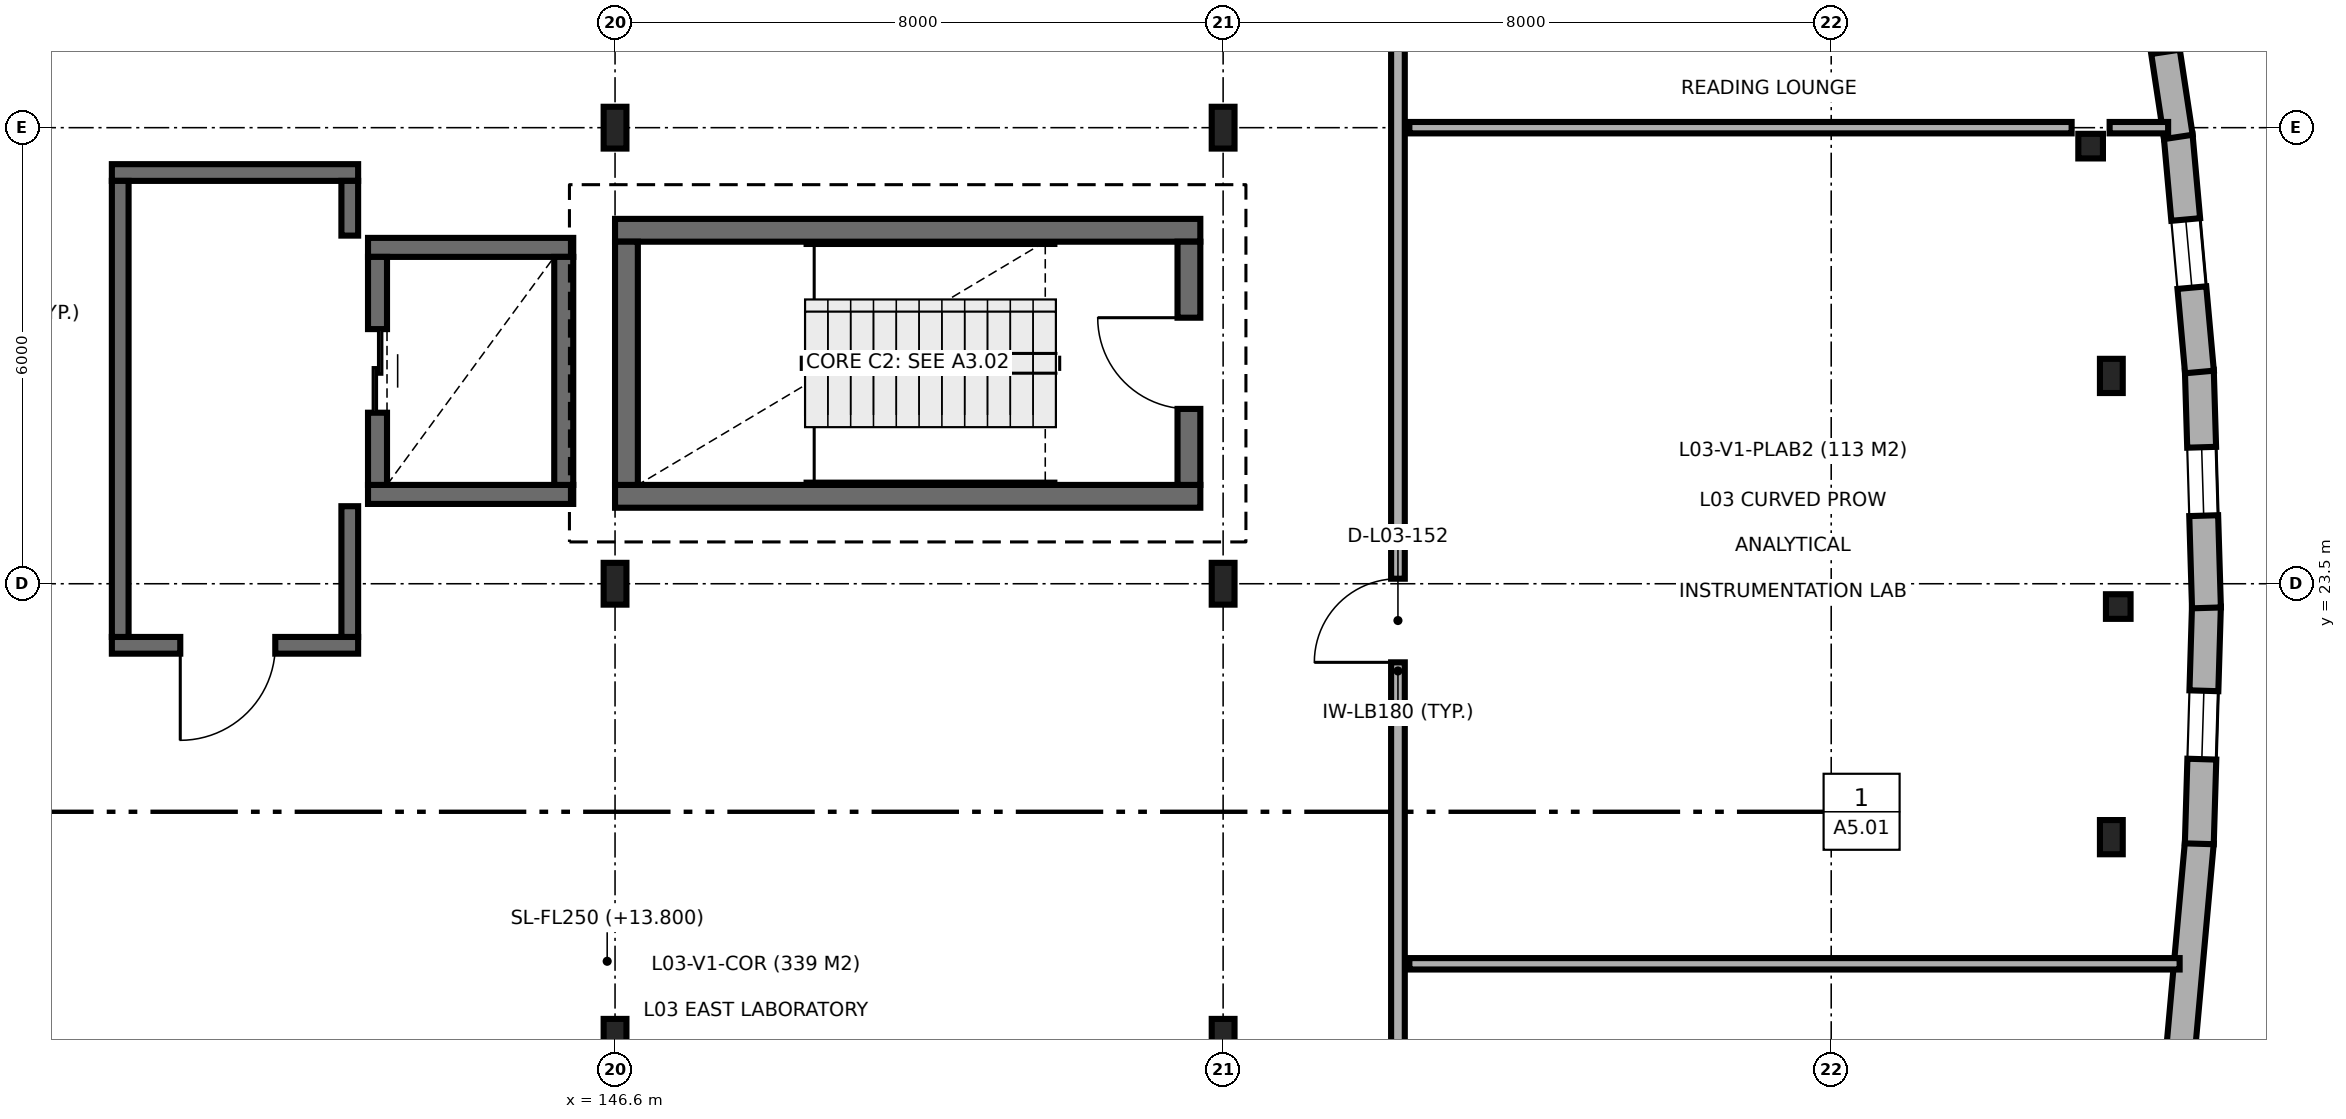
"""IFC4 building model, lengths in metres.
Left out: names, types, materials, properties, quantities, classifications, styles, units other than length and angle.
Written with IfcOpenShell. Run it as: python <this file> out.ifc"""

import sys

from ifc_helpers import new_model, si_unit, direction, frame, frame_2d, origin, origin_2d, place, context, subcontext, project, spatial, rectangle, hollow_circle, i_section, extrude, element, fill, save


model = new_model("IFC4")
c1 = context("Model", 3, precision=1e-05, world=origin(), true_north=direction((0.0, 1.0)))
c2 = subcontext(c1, "Body", "Model", "MODEL_VIEW")
j1 = project(units=[si_unit("LENGTHUNIT", "METRE"), si_unit("PLANEANGLEUNIT", "RADIAN")], contexts=[c1])
p1 = place(None, origin())
s1 = spatial("IfcSite", under=j1, at=p1, CompositionType="ELEMENT")
p2 = place(p1, origin())
s2 = spatial("IfcBuilding", under=s1, at=p2, CompositionType="ELEMENT")
p3 = place(p2, frame((0.0, 0.0, 13.8)))
s3 = spatial("IfcBuildingStorey", under=s2, at=p3, CompositionType="ELEMENT", Elevation=13.8)
for number, where, z_axis, x_axis in (
    (1, (146.6, 17.5, 0.0), (0.0, 0.0, 1.0), (1.0, 0.0, 0.0)),
    (2, (146.6, 23.5, 0.0), (0.0, 0.0, 1.0), (1.0, 0.0, 0.0)),
    (3, (146.6, 29.5, 0.0), (0.0, 0.0, 1.0), (1.0, 0.0, 0.0)),
    (4, (154.6, 17.5, 0.0), (0.0, 0.0, 1.0), (1.0, 0.0, 0.0)),
    (5, (154.6, 23.5, 0.0), (0.0, 0.0, 1.0), (1.0, 0.0, 0.0)),
    (6, (154.6, 29.5, 0.0), (0.0, 0.0, 1.0), (1.0, 0.0, 0.0)),
):
    element("IfcColumn", number, at=place(p3, frame(where, z_axis=z_axis, x_axis=x_axis)), inside=s3, PredefinedType="COLUMN", context=c2, shape_type="SweptSolid", body=[
        extrude(i_section(OverallWidth=0.3, OverallDepth=0.55, WebThickness=0.015, FlangeThickness=0.029, FilletRadius=0.027, at=origin_2d()), origin(), (0.0, 0.0, 1.0), 4.5),
    ])
p4 = place(p3, frame((166.013, 29.257, 0.0), z_axis=(0.0, 0.0, 1.0), x_axis=(1.0, 0.0, 0.0)))
e7 = element("IfcColumn", 7, at=p4, inside=s3, PredefinedType="COLUMN", context=c2, shape_type="SweptSolid", body=[
    extrude(hollow_circle(Radius=0.162, WallThickness=0.016, at=origin_2d()), origin(), (0.0, 0.0, 1.0), 4.5),
])
for number, where, z_axis, x_axis in (
    (8, (166.285, 20.166, 0.0), (0.0, 0.0, 1.0), (1.0, 0.0, 0.0)),
    (9, (166.285, 26.234, 0.0), (0.0, 0.0, 1.0), (1.0, 0.0, 0.0)),
):
    element("IfcColumn", number, at=place(p3, frame(where, z_axis=z_axis, x_axis=x_axis)), inside=s3, PredefinedType="COLUMN", context=c2, shape_type="SweptSolid", body=[
        extrude(i_section(OverallWidth=0.3, OverallDepth=0.45, WebThickness=0.014, FlangeThickness=0.026, FilletRadius=0.027, at=origin_2d()), origin(), (0.0, 0.0, 1.0), 4.5),
    ])
p5 = place(p3, frame((166.376, 23.2, 0.0), z_axis=(0.0, 0.0, 1.0), x_axis=(1.0, 0.0, 0.0)))
e10 = element("IfcColumn", 10, at=p5, inside=s3, PredefinedType="COLUMN", context=c2, shape_type="SweptSolid", body=[
    extrude(hollow_circle(Radius=0.162, WallThickness=0.016, at=origin_2d()), origin(), (0.0, 0.0, 1.0), 4.5),
])
for number, where, z_axis, x_axis in (
    (11, (146.6, 24.65, 0.0), (0.0, 0.0, 1.0), (1.0, 0.0, 0.0)),
    (12, (154.3, 28.15, 0.0), (0.0, 0.0, 1.0), (-1.0, 0.0, 0.0)),
):
    element("IfcWall", number, at=place(p3, frame(where, z_axis=z_axis, x_axis=x_axis)), inside=s3, PredefinedType="SHEAR", context=c2, shape_type="SweptSolid", body=[
        extrude(rectangle(XDim=7.7, YDim=0.3, at=frame_2d((3.85, 0.0))), origin(), (0.0, 0.0, 1.0), 4.5),
    ])
p6 = place(p3, frame((146.75, 28.0, 0.0), z_axis=(0.0, 0.0, 1.0), x_axis=(0.0, -1.0, 0.0)))
e13 = element("IfcWall", 13, at=p6, inside=s3, PredefinedType="SHEAR", context=c2, shape_type="SweptSolid", body=[
    extrude(rectangle(XDim=3.2, YDim=0.3, at=frame_2d((1.6, 0.0))), origin(), (0.0, 0.0, 1.0), 4.5),
])
p7 = place(p3, frame((154.15, 24.8, 0.0), z_axis=(0.0, 0.0, 1.0), x_axis=(0.0, 1.0, 0.0)))
e14 = element("IfcWall", 14, at=p7, inside=s3, PredefinedType="SHEAR", context=c2, shape_type="SweptSolid", body=[
    extrude(rectangle(XDim=3.2, YDim=0.3, at=frame_2d((1.6, 0.0))), origin(), (0.0, 0.0, 1.0), 4.5),
])
p8 = place(p7, frame((1.0, 0.0, 0.0)))
e15 = element("IfcOpeningElement", 15, at=p8, cuts=e14, PredefinedType="OPENING", context=c2, shape_type="SweptSolid", body=[
    extrude(rectangle(XDim=1.2, YDim=2.15, at=frame_2d((0.6, 1.075))), frame((0.0, 0.16, 0.0), z_axis=(0.0, -1.0, 0.0), x_axis=(1.0, 0.0, 0.0)), (0.0, 0.0, 1.0), 0.32),
])
for number, where, z_axis, x_axis in (
    (16, (143.35, 24.675, 0.0), (0.0, 0.0, 1.0), (1.0, 0.0, 0.0)),
    (17, (146.05, 27.925, 0.0), (0.0, 0.0, 1.0), (-1.0, 0.0, 0.0)),
):
    element("IfcWall", number, at=place(p3, frame(where, z_axis=z_axis, x_axis=x_axis)), inside=s3, PredefinedType="SHEAR", context=c2, shape_type="SweptSolid", body=[
        extrude(rectangle(XDim=2.7, YDim=0.25, at=frame_2d((1.35, 0.0))), origin(), (0.0, 0.0, 1.0), 4.5),
    ])
p9 = place(p3, frame((143.475, 27.8, 0.0), z_axis=(0.0, 0.0, 1.0), x_axis=(0.0, -1.0, 0.0)))
e18 = element("IfcWall", 18, at=p9, inside=s3, PredefinedType="SHEAR", context=c2, shape_type="SweptSolid", body=[
    extrude(rectangle(XDim=3.0, YDim=0.25, at=frame_2d((1.5, 0.0))), origin(), (0.0, 0.0, 1.0), 4.5),
])
p10 = place(p9, frame((0.95, 0.0, 0.0)))
e19 = element("IfcOpeningElement", 19, at=p10, cuts=e18, PredefinedType="OPENING", context=c2, shape_type="SweptSolid", body=[
    extrude(rectangle(XDim=1.1, YDim=2.15, at=frame_2d((0.55, 1.075))), frame((0.0, 0.135, 0.0), z_axis=(0.0, -1.0, 0.0), x_axis=(1.0, 0.0, 0.0)), (0.0, 0.0, 1.0), 0.27),
])
p11 = place(p3, frame((145.925, 24.8, 0.0), z_axis=(0.0, 0.0, 1.0), x_axis=(0.0, 1.0, 0.0)))
e20 = element("IfcWall", 20, at=p11, inside=s3, PredefinedType="SHEAR", context=c2, shape_type="SweptSolid", body=[
    extrude(rectangle(XDim=3.0, YDim=0.25, at=frame_2d((1.5, 0.0))), origin(), (0.0, 0.0, 1.0), 4.5),
])
p12 = place(p3, frame((139.98, 22.69, 0.0), z_axis=(0.0, 0.0, 1.0), x_axis=(1.0, 0.0, 0.0)))
e21 = element("IfcWall", 21, at=p12, inside=s3, PredefinedType="SOLIDWALL", context=c2, shape_type="SweptSolid", body=[
    extrude(rectangle(XDim=3.24, YDim=0.22, at=frame_2d((1.62, 0.0))), origin(), (0.0, 0.0, 1.0), 4.25),
])
p13 = place(p12, frame((0.9, 0.0, 0.0)))
e22 = element("IfcOpeningElement", 22, at=p13, cuts=e21, PredefinedType="OPENING", context=c2, shape_type="SweptSolid", body=[
    extrude(rectangle(XDim=1.25, YDim=2.15, at=frame_2d((0.625, 1.075))), frame((0.0, 0.12, 0.0), z_axis=(0.0, -1.0, 0.0), x_axis=(1.0, 0.0, 0.0)), (0.0, 0.0, 1.0), 0.24),
])
p14 = place(p3, frame((143.22, 28.91, 0.0), z_axis=(0.0, 0.0, 1.0), x_axis=(-1.0, 0.0, 0.0)))
e23 = element("IfcWall", 23, at=p14, inside=s3, PredefinedType="SOLIDWALL", context=c2, shape_type="SweptSolid", body=[
    extrude(rectangle(XDim=3.24, YDim=0.22, at=frame_2d((1.62, 0.0))), origin(), (0.0, 0.0, 1.0), 4.25),
])
p15 = place(p3, frame((140.09, 28.8, 0.0), z_axis=(0.0, 0.0, 1.0), x_axis=(0.0, -1.0, 0.0)))
e24 = element("IfcWall", 24, at=p15, inside=s3, PredefinedType="SOLIDWALL", context=c2, shape_type="SweptSolid", body=[
    extrude(rectangle(XDim=6.0, YDim=0.22, at=frame_2d((3.0, 0.0))), origin(), (0.0, 0.0, 1.0), 4.25),
])
p16 = place(p3, frame((143.11, 22.8, 0.0), z_axis=(0.0, 0.0, 1.0), x_axis=(0.0, 1.0, 0.0)))
e25 = element("IfcWall", 25, at=p16, inside=s3, PredefinedType="SOLIDWALL", context=c2, shape_type="SweptSolid", body=[
    extrude(rectangle(XDim=1.72, YDim=0.22, at=frame_2d((0.86, 0.0))), origin(), (0.0, 0.0, 1.0), 4.25),
])
p17 = place(p3, frame((143.11, 28.08, 0.0), z_axis=(0.0, 0.0, 1.0), x_axis=(0.0, 1.0, 0.0)))
e26 = element("IfcWall", 26, at=p17, inside=s3, PredefinedType="SOLIDWALL", context=c2, shape_type="SweptSolid", body=[
    extrude(rectangle(XDim=0.72, YDim=0.22, at=frame_2d((0.36, 0.0))), origin(), (0.0, 0.0, 1.0), 4.25),
])
p18 = place(p3, frame((167.163, 16.987, 0.0), z_axis=(0.0, 0.0, 1.0), x_axis=(0.089747627339, 0.995964539222, 0.0)))
e27 = element("IfcWall", 27, at=p18, inside=s3, PredefinedType="SOLIDWALL", context=c2, shape_type="SweptSolid", body=[
    extrude(rectangle(XDim=3.128, YDim=0.38, at=frame_2d((1.564, 0.0))), origin(), (0.0, 0.0, 1.0), 4.25),
])
p19 = place(p3, frame((167.443, 20.079, 0.0), z_axis=(0.0, 0.0, 1.0), x_axis=(0.02996779607, 0.999550864738, 0.0)))
e28 = element("IfcWall", 28, at=p19, inside=s3, PredefinedType="SOLIDWALL", context=c2, shape_type="SweptSolid", body=[
    extrude(rectangle(XDim=3.128, YDim=0.38, at=frame_2d((1.564, 0.0))), origin(), (0.0, 0.0, 1.0), 4.25),
])
p20 = place(p19, frame((1.114, 0.0, 0.9)))
e29 = element("IfcOpeningElement", 29, at=p20, cuts=e28, PredefinedType="OPENING", context=c2, shape_type="SweptSolid", body=[
    extrude(rectangle(XDim=0.9, YDim=1.8, at=frame_2d((0.45, 0.9))), frame((0.0, 0.2, 0.0), z_axis=(0.0, -1.0, 0.0), x_axis=(1.0, 0.0, 0.0)), (0.0, 0.0, 1.0), 0.4),
])
p21 = place(p3, frame((167.537, 23.182, 0.0), z_axis=(0.0, 0.0, 1.0), x_axis=(-0.029970133922, 0.999550794644, 0.0)))
e30 = element("IfcWall", 30, at=p21, inside=s3, PredefinedType="SOLIDWALL", context=c2, shape_type="SweptSolid", body=[
    extrude(rectangle(XDim=3.128, YDim=0.38, at=frame_2d((1.564, 0.0))), origin(), (0.0, 0.0, 1.0), 4.25),
])
p22 = place(p21, frame((1.214, 0.0, 0.9)))
e31 = element("IfcOpeningElement", 31, at=p22, cuts=e30, PredefinedType="OPENING", context=c2, shape_type="SweptSolid", body=[
    extrude(rectangle(XDim=0.9, YDim=1.8, at=frame_2d((0.45, 0.9))), frame((0.0, 0.2, 0.0), z_axis=(0.0, -1.0, 0.0), x_axis=(1.0, 0.0, 0.0)), (0.0, 0.0, 1.0), 0.4),
])
p23 = place(p3, frame((167.445, 26.286, 0.0), z_axis=(0.0, 0.0, 1.0), x_axis=(-0.089747627339, 0.995964539222, 0.0)))
e32 = element("IfcWall", 32, at=p23, inside=s3, PredefinedType="SOLIDWALL", context=c2, shape_type="SweptSolid", body=[
    extrude(rectangle(XDim=3.128, YDim=0.38, at=frame_2d((1.564, 0.0))), origin(), (0.0, 0.0, 1.0), 4.25),
])
p24 = place(p23, frame((1.114, 0.0, 0.9)))
e33 = element("IfcOpeningElement", 33, at=p24, cuts=e32, PredefinedType="OPENING", context=c2, shape_type="SweptSolid", body=[
    extrude(rectangle(XDim=0.9, YDim=1.8, at=frame_2d((0.45, 0.9))), frame((0.0, 0.2, 0.0), z_axis=(0.0, -1.0, 0.0), x_axis=(1.0, 0.0, 0.0)), (0.0, 0.0, 1.0), 0.4),
])
p25 = place(p3, frame((167.167, 29.378, 0.0), z_axis=(0.0, 0.0, 1.0), x_axis=(-0.149305964746, 0.988791044099, 0.0)))
e34 = element("IfcWall", 34, at=p25, inside=s3, PredefinedType="SOLIDWALL", context=c2, shape_type="SweptSolid", body=[
    extrude(rectangle(XDim=3.128, YDim=0.38, at=frame_2d((1.564, 0.0))), origin(), (0.0, 0.0, 1.0), 4.25),
])
p26 = place(p25, frame((1.132, 0.0, 0.9)))
e35 = element("IfcOpeningElement", 35, at=p26, cuts=e34, PredefinedType="OPENING", context=c2, shape_type="SweptSolid", body=[
    extrude(rectangle(XDim=0.9, YDim=1.8, at=frame_2d((0.45, 0.9))), frame((0.0, 0.2, 0.0), z_axis=(0.0, -1.0, 0.0), x_axis=(1.0, 0.0, 0.0)), (0.0, 0.0, 1.0), 0.4),
])
p27 = place(p3, frame((156.9, 5.205, 0.0), z_axis=(0.0, 0.0, 1.0), x_axis=(0.0, 1.0, 0.0)))
e36 = element("IfcWall", 36, at=p27, inside=s3, PredefinedType="PARTITIONING", context=c2, shape_type="SweptSolid", body=[
    extrude(rectangle(XDim=34.295, YDim=0.18, at=frame_2d((17.147, 0.0))), origin(), (0.0, 0.0, 1.0), 4.25),
])
p28 = place(p27, frame((6.559, 0.0, 0.0)))
e37 = element("IfcOpeningElement", 37, at=p28, cuts=e36, PredefinedType="OPENING", context=c2, shape_type="SweptSolid", body=[
    extrude(rectangle(XDim=1.5, YDim=2.2, at=frame_2d((0.75, 1.1))), frame((0.0, 0.1, 0.0), z_axis=(0.0, -1.0, 0.0), x_axis=(1.0, 0.0, 0.0)), (0.0, 0.0, 1.0), 0.2),
])
p29 = place(p27, frame((17.261, 0.0, 0.0)))
e38 = element("IfcOpeningElement", 38, at=p29, cuts=e36, PredefinedType="OPENING", context=c2, shape_type="SweptSolid", body=[
    extrude(rectangle(XDim=1.1, YDim=2.15, at=frame_2d((0.55, 1.075))), frame((0.0, 0.1, 0.0), z_axis=(0.0, -1.0, 0.0), x_axis=(1.0, 0.0, 0.0)), (0.0, 0.0, 1.0), 0.2),
])
p30 = place(p27, frame((27.343, 0.0, 0.0)))
e39 = element("IfcOpeningElement", 39, at=p30, cuts=e36, PredefinedType="OPENING", context=c2, shape_type="SweptSolid", body=[
    extrude(rectangle(XDim=0.95, YDim=2.1, at=frame_2d((0.475, 1.05))), frame((0.0, 0.1, 0.0), z_axis=(0.0, -1.0, 0.0), x_axis=(1.0, 0.0, 0.0)), (0.0, 0.0, 1.0), 0.2),
])
p31 = place(p3, frame((157.05, 18.5, 0.0), z_axis=(0.0, 0.0, 1.0), x_axis=(1.0, 0.0, 0.0)))
e40 = element("IfcWall", 40, at=p31, inside=s3, PredefinedType="PARTITIONING", context=c2, shape_type="SweptSolid", body=[
    extrude(rectangle(XDim=10.134, YDim=0.15, at=frame_2d((5.067, 0.0))), origin(), (0.0, 0.0, 1.0), 3.75),
])
p32 = place(p3, frame((157.05, 29.5, 0.0), z_axis=(0.0, 0.0, 1.0), x_axis=(1.0, 0.0, 0.0)))
e41 = element("IfcWall", 41, at=p32, inside=s3, PredefinedType="PARTITIONING", context=c2, shape_type="SweptSolid", body=[
    extrude(rectangle(XDim=8.713, YDim=0.15, at=frame_2d((4.356, 0.0))), origin(), (0.0, 0.0, 1.0), 3.75),
])
p33 = place(p3, frame((166.263, 29.5, 0.0), z_axis=(0.0, 0.0, 1.0), x_axis=(1.0, 0.0, 0.0)))
e42 = element("IfcWall", 42, at=p33, inside=s3, PredefinedType="PARTITIONING", context=c2, shape_type="SweptSolid", body=[
    extrude(rectangle(XDim=0.77, YDim=0.15, at=frame_2d((0.385, 0.0))), origin(), (0.0, 0.0, 1.0), 4.25),
])
p34 = place(p8, origin())
e43 = element("IfcDoor", 43, at=p34, inside=s3, OperationType="SINGLE_SWING_RIGHT", PredefinedType="DOOR", context=c2, shape_type="SweptSolid", body=[
    extrude(rectangle(XDim=1.2, YDim=2.15, at=frame_2d((0.6, 1.075))), frame((0.0, 0.025, 0.0), z_axis=(0.0, -1.0, 0.0), x_axis=(1.0, 0.0, 0.0)), (0.0, 0.0, 1.0), 0.05),
])
fill(e15, e43)
p35 = place(p10, origin())
e44 = element("IfcDoor", 44, at=p35, inside=s3, OperationType="DOUBLE_DOOR_SLIDING", PredefinedType="DOOR", context=c2, shape_type="SweptSolid", body=[
    extrude(rectangle(XDim=1.1, YDim=2.15, at=frame_2d((0.55, 1.075))), frame((0.0, 0.025, 0.0), z_axis=(0.0, -1.0, 0.0), x_axis=(1.0, 0.0, 0.0)), (0.0, 0.0, 1.0), 0.05),
])
fill(e19, e44)
p36 = place(p13, frame((1.25, 0.0, 0.0), z_axis=(0.0, 0.0, 1.0), x_axis=(-1.0, 0.0, 0.0)))
e45 = element("IfcDoor", 45, at=p36, inside=s3, OperationType="SINGLE_SWING_LEFT", PredefinedType="DOOR", context=c2, shape_type="SweptSolid", body=[
    extrude(rectangle(XDim=1.25, YDim=2.15, at=frame_2d((0.625, 1.075))), frame((0.0, 0.025, 0.0), z_axis=(0.0, -1.0, 0.0), x_axis=(1.0, 0.0, 0.0)), (0.0, 0.0, 1.0), 0.05),
])
fill(e22, e45)
p37 = place(p20, origin())
e46 = element("IfcWindow", 46, at=p37, inside=s3, PartitioningType="SINGLE_PANEL", PredefinedType="WINDOW", context=c2, shape_type="SweptSolid", body=[
    extrude(rectangle(XDim=0.9, YDim=1.8, at=frame_2d((0.45, 0.9))), frame((0.0, 0.03, 0.0), z_axis=(0.0, -1.0, 0.0), x_axis=(1.0, 0.0, 0.0)), (0.0, 0.0, 1.0), 0.06),
])
fill(e29, e46)
p38 = place(p22, origin())
e47 = element("IfcWindow", 47, at=p38, inside=s3, PartitioningType="SINGLE_PANEL", PredefinedType="WINDOW", context=c2, shape_type="SweptSolid", body=[
    extrude(rectangle(XDim=0.9, YDim=1.8, at=frame_2d((0.45, 0.9))), frame((0.0, 0.03, 0.0), z_axis=(0.0, -1.0, 0.0), x_axis=(1.0, 0.0, 0.0)), (0.0, 0.0, 1.0), 0.06),
])
fill(e31, e47)
p39 = place(p24, origin())
e48 = element("IfcWindow", 48, at=p39, inside=s3, PartitioningType="SINGLE_PANEL", PredefinedType="WINDOW", context=c2, shape_type="SweptSolid", body=[
    extrude(rectangle(XDim=0.9, YDim=1.8, at=frame_2d((0.45, 0.9))), frame((0.0, 0.03, 0.0), z_axis=(0.0, -1.0, 0.0), x_axis=(1.0, 0.0, 0.0)), (0.0, 0.0, 1.0), 0.06),
])
fill(e33, e48)
p40 = place(p26, origin())
e49 = element("IfcWindow", 49, at=p40, inside=s3, PartitioningType="SINGLE_PANEL", PredefinedType="WINDOW", context=c2, shape_type="SweptSolid", body=[
    extrude(rectangle(XDim=0.9, YDim=1.8, at=frame_2d((0.45, 0.9))), frame((0.0, 0.03, 0.0), z_axis=(0.0, -1.0, 0.0), x_axis=(1.0, 0.0, 0.0)), (0.0, 0.0, 1.0), 0.06),
])
fill(e35, e49)
p41 = place(p29, origin())
e50 = element("IfcDoor", 50, at=p41, inside=s3, OperationType="SINGLE_SWING_LEFT", PredefinedType="DOOR", context=c2, shape_type="SweptSolid", body=[
    extrude(rectangle(XDim=1.1, YDim=2.15, at=frame_2d((0.55, 1.075))), frame((0.0, 0.025, 0.0), z_axis=(0.0, -1.0, 0.0), x_axis=(1.0, 0.0, 0.0)), (0.0, 0.0, 1.0), 0.05),
])
fill(e38, e50)
save(model, sys.argv[1])
